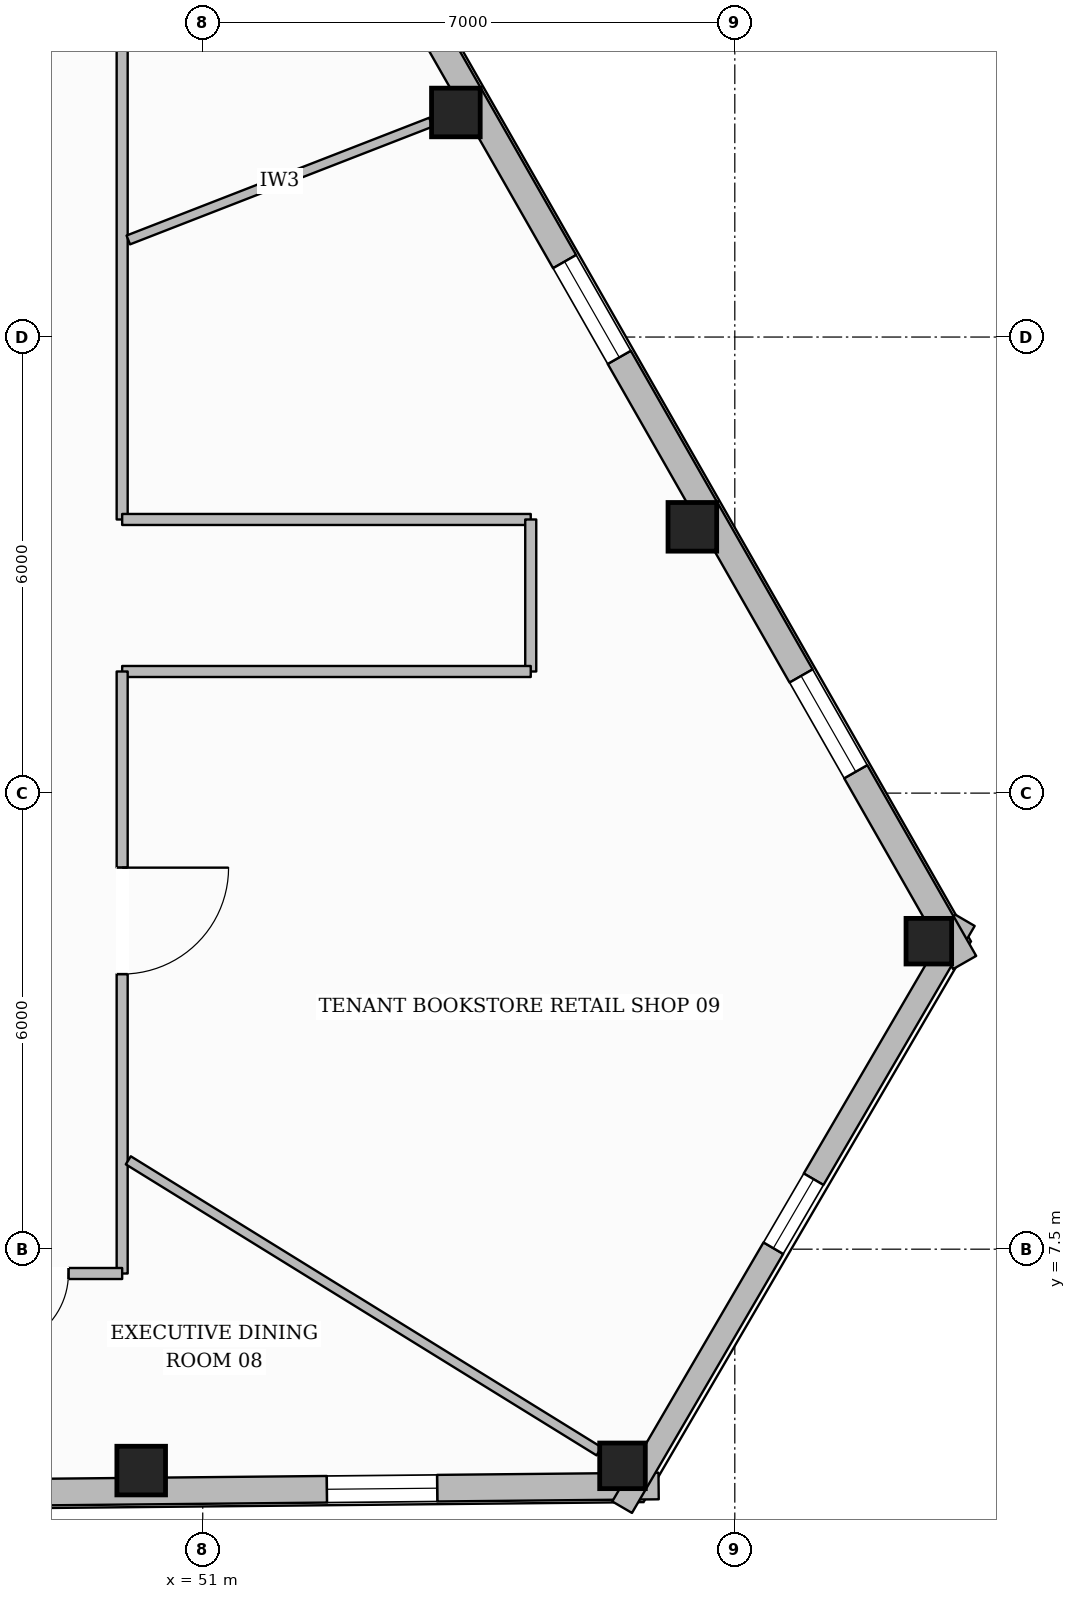
"""IFC4 building model, lengths in metres.
Left out: names, types, materials, properties, quantities, classifications, styles, units other than length and angle.
Written with IfcOpenShell. Run it as: python <this file> out.ifc"""

import sys

from ifc_helpers import new_model, si_unit, direction, frame, frame_2d, origin, origin_2d, place, context, subcontext, project, spatial, rectangle, hollow_rectangle, extrude, element, fill, save


model = new_model("IFC4")
c1 = context("Model", 3, precision=1e-05, world=origin(), true_north=direction((0.0, 1.0)))
c2 = subcontext(c1, "Body", "Model", "MODEL_VIEW")
j1 = project(units=[si_unit("LENGTHUNIT", "METRE"), si_unit("PLANEANGLEUNIT", "RADIAN")], contexts=[c1])
p1 = place(None, origin())
s1 = spatial("IfcSite", under=j1, at=p1, CompositionType="ELEMENT")
p2 = place(p1, origin())
s2 = spatial("IfcBuilding", under=s1, at=p2, CompositionType="ELEMENT")
p3 = place(p2, frame((0.0, 0.0, 218.9)))
s3 = spatial("IfcBuildingStorey", under=s2, at=p3, CompositionType="ELEMENT", Elevation=218.9)
p4 = place(p3, frame((50.19, 4.587, 0.0), z_axis=(0.0, 0.0, 1.0), x_axis=(1.0, 0.0, 0.0)))
e1 = element("IfcColumn", 1, at=p4, inside=s3, PredefinedType="COLUMN", context=c2, shape_type="SweptSolid", body=[
    extrude(hollow_rectangle(XDim=0.64, YDim=0.64, WallThickness=0.028, at=origin_2d()), origin(), (0.0, 0.0, 1.0), 3.6),
])
for number, where, z_axis, x_axis in (
    (2, (56.522, 4.65, 0.0), (0.0, 0.0, 1.0), (1.0, 0.0, 0.0)),
    (3, (60.553, 11.552, 0.0), (0.0, 0.0, 1.0), (1.0, 0.0, 0.0)),
):
    element("IfcColumn", number, at=place(p3, frame(where, z_axis=z_axis, x_axis=x_axis)), inside=s3, PredefinedType="COLUMN", context=c2, shape_type="SweptSolid", body=[
        extrude(hollow_rectangle(XDim=0.6, YDim=0.6, WallThickness=0.028, at=origin_2d()), origin(), (0.0, 0.0, 1.0), 3.6),
    ])
for number, where, z_axis, x_axis in (
    (4, (57.441, 17.003, 0.0), (0.0, 0.0, 1.0), (1.0, 0.0, 0.0)),
    (5, (54.33, 22.454, 0.0), (0.0, 0.0, 1.0), (1.0, 0.0, 0.0)),
):
    element("IfcColumn", number, at=place(p3, frame(where, z_axis=z_axis, x_axis=x_axis)), inside=s3, PredefinedType="COLUMN", context=c2, shape_type="SweptSolid", body=[
        extrude(hollow_rectangle(XDim=0.64, YDim=0.64, WallThickness=0.028, at=origin_2d()), origin(), (0.0, 0.0, 1.0), 3.6),
    ])
p5 = place(p3, frame((56.998, 4.385, 0.0), z_axis=(0.0, 0.0, 1.0), x_axis=(-0.999951327982, -0.009866188108, 0.0)))
e6 = element("IfcWall", 6, at=p5, inside=s3, PredefinedType="STANDARD", context=c2, shape_type="SweptSolid", body=[
    extrude(rectangle(XDim=38.949, YDim=0.35, at=frame_2d((19.475, 0.0))), origin(), (0.0, 0.0, 1.0), 3.132),
])
p6 = place(p5, frame((34.576, 0.0, 0.65)))
e7 = element("IfcOpeningElement", 7, at=p6, cuts=e6, PredefinedType="OPENING", context=c2, shape_type="SweptSolid", body=[
    extrude(rectangle(XDim=1.45, YDim=1.75, at=frame_2d((0.725, 0.875))), frame((0.0, 0.185, 0.0), z_axis=(0.0, -1.0, 0.0), x_axis=(1.0, 0.0, 0.0)), (0.0, 0.0, 1.0), 0.37),
])
p7 = place(p5, frame((28.243, 0.0, 0.65)))
e8 = element("IfcOpeningElement", 8, at=p7, cuts=e6, PredefinedType="OPENING", context=c2, shape_type="SweptSolid", body=[
    extrude(rectangle(XDim=1.45, YDim=1.75, at=frame_2d((0.725, 0.875))), frame((0.0, 0.185, 0.0), z_axis=(0.0, -1.0, 0.0), x_axis=(1.0, 0.0, 0.0)), (0.0, 0.0, 1.0), 0.37),
])
p8 = place(p5, frame((15.579, 0.0, 0.65)))
e9 = element("IfcOpeningElement", 9, at=p8, cuts=e6, PredefinedType="OPENING", context=c2, shape_type="SweptSolid", body=[
    extrude(rectangle(XDim=1.45, YDim=1.75, at=frame_2d((0.725, 0.875))), frame((0.0, 0.185, 0.0), z_axis=(0.0, -1.0, 0.0), x_axis=(1.0, 0.0, 0.0)), (0.0, 0.0, 1.0), 0.37),
])
p9 = place(p5, frame((9.246, 0.0, 0.65)))
e10 = element("IfcOpeningElement", 10, at=p9, cuts=e6, PredefinedType="OPENING", context=c2, shape_type="SweptSolid", body=[
    extrude(rectangle(XDim=1.45, YDim=1.75, at=frame_2d((0.725, 0.875))), frame((0.0, 0.185, 0.0), z_axis=(0.0, -1.0, 0.0), x_axis=(1.0, 0.0, 0.0)), (0.0, 0.0, 1.0), 0.37),
])
p10 = place(p5, frame((2.914, 0.0, 0.65)))
e11 = element("IfcOpeningElement", 11, at=p10, cuts=e6, PredefinedType="OPENING", context=c2, shape_type="SweptSolid", body=[
    extrude(rectangle(XDim=1.45, YDim=1.75, at=frame_2d((0.725, 0.875))), frame((0.0, 0.185, 0.0), z_axis=(0.0, -1.0, 0.0), x_axis=(1.0, 0.0, 0.0)), (0.0, 0.0, 1.0), 0.37),
])
p11 = place(p3, frame((61.026, 11.828, 0.0), z_axis=(0.0, 0.0, 1.0), x_axis=(-0.504220681264, -0.863574840176, 0.0)))
e12 = element("IfcWall", 12, at=p11, inside=s3, PredefinedType="STANDARD", context=c2, shape_type="SweptSolid", body=[
    extrude(rectangle(XDim=8.942, YDim=0.3, at=frame_2d((4.471, 0.0))), origin(), (0.0, 0.0, 1.0), 3.132),
])
p12 = place(p11, frame((3.946, 0.0, 0.65)))
e13 = element("IfcOpeningElement", 13, at=p12, cuts=e12, PredefinedType="OPENING", context=c2, shape_type="SweptSolid", body=[
    extrude(rectangle(XDim=1.05, YDim=1.7, at=frame_2d((0.525, 0.85))), frame((0.0, 0.16, 0.0), z_axis=(0.0, -1.0, 0.0), x_axis=(1.0, 0.0, 0.0)), (0.0, 0.0, 1.0), 0.32),
])
p13 = place(p3, frame((41.881, 44.812, 0.0), z_axis=(0.0, 0.0, 1.0), x_axis=(0.495686807291, -0.868501346618, 0.0)))
e14 = element("IfcWall", 14, at=p13, inside=s3, PredefinedType="STANDARD", context=c2, shape_type="SweptSolid", body=[
    extrude(rectangle(XDim=38.618, YDim=0.35, at=frame_2d((19.309, 0.0))), origin(), (0.0, 0.0, 1.0), 3.132),
])
p14 = place(p13, frame((34.278, 0.0, 0.65)))
e15 = element("IfcOpeningElement", 15, at=p14, cuts=e14, PredefinedType="OPENING", context=c2, shape_type="SweptSolid", body=[
    extrude(rectangle(XDim=1.45, YDim=1.75, at=frame_2d((0.725, 0.875))), frame((0.0, 0.185, 0.0), z_axis=(0.0, -1.0, 0.0), x_axis=(1.0, 0.0, 0.0)), (0.0, 0.0, 1.0), 0.37),
])
p15 = place(p13, frame((28.001, 0.0, 0.65)))
e16 = element("IfcOpeningElement", 16, at=p15, cuts=e14, PredefinedType="OPENING", context=c2, shape_type="SweptSolid", body=[
    extrude(rectangle(XDim=1.45, YDim=1.75, at=frame_2d((0.725, 0.875))), frame((0.0, 0.185, 0.0), z_axis=(0.0, -1.0, 0.0), x_axis=(1.0, 0.0, 0.0)), (0.0, 0.0, 1.0), 0.37),
])
p16 = place(p13, frame((15.448, 0.0, 0.65)))
e17 = element("IfcOpeningElement", 17, at=p16, cuts=e14, PredefinedType="OPENING", context=c2, shape_type="SweptSolid", body=[
    extrude(rectangle(XDim=1.45, YDim=1.75, at=frame_2d((0.725, 0.875))), frame((0.0, 0.185, 0.0), z_axis=(0.0, -1.0, 0.0), x_axis=(1.0, 0.0, 0.0)), (0.0, 0.0, 1.0), 0.37),
])
p17 = place(p13, frame((9.172, 0.0, 0.65)))
e18 = element("IfcOpeningElement", 18, at=p17, cuts=e14, PredefinedType="OPENING", context=c2, shape_type="SweptSolid", body=[
    extrude(rectangle(XDim=1.45, YDim=1.75, at=frame_2d((0.725, 0.875))), frame((0.0, 0.185, 0.0), z_axis=(0.0, -1.0, 0.0), x_axis=(1.0, 0.0, 0.0)), (0.0, 0.0, 1.0), 0.37),
])
p18 = place(p13, frame((2.895, 0.0, 0.65)))
e19 = element("IfcOpeningElement", 19, at=p18, cuts=e14, PredefinedType="OPENING", context=c2, shape_type="SweptSolid", body=[
    extrude(rectangle(XDim=1.45, YDim=1.75, at=frame_2d((0.725, 0.875))), frame((0.0, 0.185, 0.0), z_axis=(0.0, -1.0, 0.0), x_axis=(1.0, 0.0, 0.0)), (0.0, 0.0, 1.0), 0.37),
])
p19 = place(p3, frame((49.94, 25.02, 0.0), z_axis=(0.0, 0.0, 1.0), x_axis=(0.0, -1.0, 0.0)))
e20 = element("IfcWall", 20, at=p19, inside=s3, PredefinedType="PARTITIONING", context=c2, shape_type="SweptSolid", body=[
    extrude(rectangle(XDim=7.92, YDim=0.145, at=frame_2d((3.96, 0.0))), origin(), (0.0, 0.0, 1.0), 3.339),
])
p20 = place(p3, frame((49.94, 17.1, 0.0), z_axis=(0.0, 0.0, 1.0), x_axis=(1.0, 0.0, 0.0)))
e21 = element("IfcWall", 21, at=p20, inside=s3, PredefinedType="PARTITIONING", context=c2, shape_type="SweptSolid", body=[
    extrude(rectangle(XDim=5.375, YDim=0.145, at=frame_2d((2.688, 0.0))), origin(), (0.0, 0.0, 1.0), 3.141),
])
p21 = place(p3, frame((55.315, 17.1, 0.0), z_axis=(0.0, 0.0, 1.0), x_axis=(0.0, -1.0, 0.0)))
e22 = element("IfcWall", 22, at=p21, inside=s3, PredefinedType="PARTITIONING", context=c2, shape_type="SweptSolid", body=[
    extrude(rectangle(XDim=2.0, YDim=0.145, at=frame_2d((1.0, 0.0))), origin(), (0.0, 0.0, 1.0), 3.339),
])
p22 = place(p3, frame((55.315, 15.1, 0.0), z_axis=(0.0, 0.0, 1.0), x_axis=(-1.0, 0.0, 0.0)))
e23 = element("IfcWall", 23, at=p22, inside=s3, PredefinedType="PARTITIONING", context=c2, shape_type="SweptSolid", body=[
    extrude(rectangle(XDim=5.375, YDim=0.145, at=frame_2d((2.688, 0.0))), origin(), (0.0, 0.0, 1.0), 3.6),
])
p23 = place(p3, frame((49.94, 15.1, 0.0), z_axis=(0.0, 0.0, 1.0), x_axis=(0.0, -1.0, 0.0)))
e24 = element("IfcWall", 24, at=p23, inside=s3, PredefinedType="PARTITIONING", context=c2, shape_type="SweptSolid", body=[
    extrude(rectangle(XDim=7.92, YDim=0.145, at=frame_2d((3.96, 0.0))), origin(), (0.0, 0.0, 1.0), 3.6),
])
p24 = place(p23, frame((2.581, 0.0, 0.0)))
e25 = element("IfcOpeningElement", 25, at=p24, cuts=e24, PredefinedType="OPENING", context=c2, shape_type="SweptSolid", body=[
    extrude(rectangle(XDim=1.4, YDim=2.2, at=frame_2d((0.7, 1.1))), frame((0.0, 0.083, 0.0), z_axis=(0.0, -1.0, 0.0), x_axis=(1.0, 0.0, 0.0)), (0.0, 0.0, 1.0), 0.165),
])
p25 = place(p3, frame((49.94, 7.18, 0.0), z_axis=(0.0, 0.0, 1.0), x_axis=(-1.0, 0.0, 0.0)))
e26 = element("IfcWall", 26, at=p25, inside=s3, PredefinedType="PARTITIONING", context=c2, shape_type="SweptSolid", body=[
    extrude(rectangle(XDim=23.88, YDim=0.145, at=frame_2d((11.94, 0.0))), origin(), (0.0, 0.0, 1.0), 3.6),
])
p26 = place(p25, frame((18.5, 0.0, 0.0)))
e27 = element("IfcOpeningElement", 27, at=p26, cuts=e26, PredefinedType="OPENING", context=c2, shape_type="SweptSolid", body=[
    extrude(rectangle(XDim=0.88, YDim=2.1, at=frame_2d((0.44, 1.05))), frame((0.0, 0.083, 0.0), z_axis=(0.0, -1.0, 0.0), x_axis=(1.0, 0.0, 0.0)), (0.0, 0.0, 1.0), 0.165),
])
p27 = place(p25, frame((15.98, 0.0, 0.0)))
e28 = element("IfcOpeningElement", 28, at=p27, cuts=e26, PredefinedType="OPENING", context=c2, shape_type="SweptSolid", body=[
    extrude(rectangle(XDim=0.88, YDim=2.1, at=frame_2d((0.44, 1.05))), frame((0.0, 0.083, 0.0), z_axis=(0.0, -1.0, 0.0), x_axis=(1.0, 0.0, 0.0)), (0.0, 0.0, 1.0), 0.165),
])
p28 = place(p25, frame((13.52, 0.0, 0.0)))
e29 = element("IfcOpeningElement", 29, at=p28, cuts=e26, PredefinedType="OPENING", context=c2, shape_type="SweptSolid", body=[
    extrude(rectangle(XDim=0.96, YDim=2.1, at=frame_2d((0.48, 1.05))), frame((0.0, 0.083, 0.0), z_axis=(0.0, -1.0, 0.0), x_axis=(1.0, 0.0, 0.0)), (0.0, 0.0, 1.0), 0.165),
])
p29 = place(p25, frame((7.332, 0.0, 0.0)))
e30 = element("IfcOpeningElement", 30, at=p29, cuts=e26, PredefinedType="OPENING", context=c2, shape_type="SweptSolid", body=[
    extrude(rectangle(XDim=0.98, YDim=2.15, at=frame_2d((0.49, 1.075))), frame((0.0, 0.083, 0.0), z_axis=(0.0, -1.0, 0.0), x_axis=(1.0, 0.0, 0.0)), (0.0, 0.0, 1.0), 0.165),
])
p30 = place(p25, frame((0.707, 0.0, 0.0)))
e31 = element("IfcOpeningElement", 31, at=p30, cuts=e26, PredefinedType="OPENING", context=c2, shape_type="SweptSolid", body=[
    extrude(rectangle(XDim=0.98, YDim=2.15, at=frame_2d((0.49, 1.075))), frame((0.0, 0.083, 0.0), z_axis=(0.0, -1.0, 0.0), x_axis=(1.0, 0.0, 0.0)), (0.0, 0.0, 1.0), 0.165),
])
p31 = place(p3, frame((50.021, 20.777, 0.0), z_axis=(0.0, 0.0, 1.0), x_axis=(0.931934949803, 0.362625494601, 0.0)))
e32 = element("IfcWall", 32, at=p31, inside=s3, PredefinedType="PARTITIONING", context=c2, shape_type="SweptSolid", body=[
    extrude(rectangle(XDim=4.272, YDim=0.125, at=frame_2d((2.136, 0.0))), origin(), (0.0, 0.0, 1.0), 3.6),
])
p32 = place(p3, frame((50.021, 8.669, 0.0), z_axis=(0.0, 0.0, 1.0), x_axis=(0.850592933727, -0.525824743706, 0.0)))
e33 = element("IfcWall", 33, at=p32, inside=s3, PredefinedType="PARTITIONING", context=c2, shape_type="SweptSolid", body=[
    extrude(rectangle(XDim=7.282, YDim=0.125, at=frame_2d((3.641, 0.0))), origin(), (0.0, 0.0, 1.0), 3.141),
])
p33 = place(p10, origin())
e34 = element("IfcWindow", 34, at=p33, inside=s3, PartitioningType="SINGLE_PANEL", PredefinedType="WINDOW", context=c2, shape_type="SweptSolid", body=[
    extrude(rectangle(XDim=1.45, YDim=1.75, at=frame_2d((0.725, 0.875))), frame((0.0, 0.03, 0.0), z_axis=(0.0, -1.0, 0.0), x_axis=(1.0, 0.0, 0.0)), (0.0, 0.0, 1.0), 0.06),
])
fill(e11, e34)
p34 = place(p14, origin())
e35 = element("IfcWindow", 35, at=p34, inside=s3, PartitioningType="SINGLE_PANEL", PredefinedType="WINDOW", context=c2, shape_type="SweptSolid", body=[
    extrude(rectangle(XDim=1.45, YDim=1.75, at=frame_2d((0.725, 0.875))), frame((0.0, 0.03, 0.0), z_axis=(0.0, -1.0, 0.0), x_axis=(1.0, 0.0, 0.0)), (0.0, 0.0, 1.0), 0.06),
])
fill(e15, e35)
p35 = place(p15, origin())
e36 = element("IfcWindow", 36, at=p35, inside=s3, PartitioningType="SINGLE_PANEL", PredefinedType="WINDOW", context=c2, shape_type="SweptSolid", body=[
    extrude(rectangle(XDim=1.45, YDim=1.75, at=frame_2d((0.725, 0.875))), frame((0.0, 0.03, 0.0), z_axis=(0.0, -1.0, 0.0), x_axis=(1.0, 0.0, 0.0)), (0.0, 0.0, 1.0), 0.06),
])
fill(e16, e36)
p36 = place(p12, origin())
e37 = element("IfcWindow", 37, at=p36, inside=s3, PartitioningType="SINGLE_PANEL", PredefinedType="WINDOW", context=c2, shape_type="SweptSolid", body=[
    extrude(rectangle(XDim=1.05, YDim=1.7, at=frame_2d((0.525, 0.85))), frame((0.0, 0.03, 0.0), z_axis=(0.0, -1.0, 0.0), x_axis=(1.0, 0.0, 0.0)), (0.0, 0.0, 1.0), 0.06),
])
fill(e13, e37)
p37 = place(p30, origin())
e38 = element("IfcDoor", 38, at=p37, inside=s3, OperationType="SINGLE_SWING_RIGHT", PredefinedType="DOOR", context=c2, shape_type="SweptSolid", body=[
    extrude(rectangle(XDim=0.98, YDim=2.15, at=frame_2d((0.49, 1.075))), frame((0.0, 0.025, 0.0), z_axis=(0.0, -1.0, 0.0), x_axis=(1.0, 0.0, 0.0)), (0.0, 0.0, 1.0), 0.05),
])
fill(e31, e38)
p38 = place(p24, origin())
e39 = element("IfcDoor", 39, at=p38, inside=s3, OperationType="SINGLE_SWING_LEFT", PredefinedType="DOOR", context=c2, shape_type="SweptSolid", body=[
    extrude(rectangle(XDim=1.4, YDim=2.2, at=frame_2d((0.7, 1.1))), frame((0.0, 0.025, 0.0), z_axis=(0.0, -1.0, 0.0), x_axis=(1.0, 0.0, 0.0)), (0.0, 0.0, 1.0), 0.05),
])
fill(e25, e39)
save(model, sys.argv[1])
